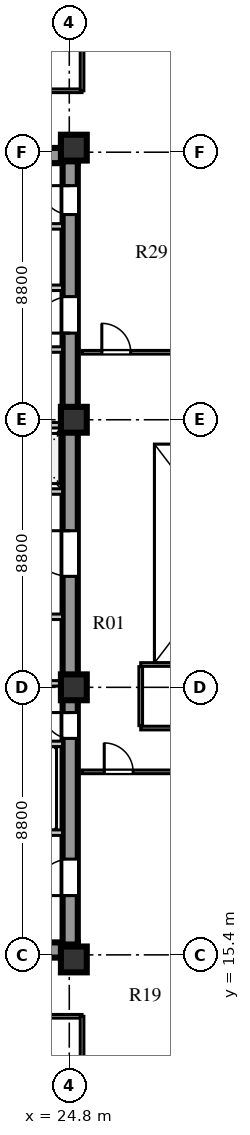
"""IFC4 building model, lengths in metres.
Left out: names, types, materials, properties, quantities, classifications, styles, units other than length and angle.
Written with IfcOpenShell. Run it as: python <this file> out.ifc"""

import sys

from ifc_helpers import new_model, si_unit, direction, frame, frame_2d, origin, origin_2d, place, context, subcontext, project, spatial, rectangle, extrude, element, fill, save


model = new_model("IFC4")
c1 = context("Model", 3, precision=1e-05, world=origin(), true_north=direction((0.0, 1.0)))
c2 = subcontext(c1, "Body", "Model", "MODEL_VIEW")
j1 = project(units=[si_unit("LENGTHUNIT", "METRE"), si_unit("PLANEANGLEUNIT", "RADIAN")], contexts=[c1])
p1 = place(None, origin())
s1 = spatial("IfcSite", under=j1, at=p1, CompositionType="ELEMENT")
p2 = place(p1, origin())
s2 = spatial("IfcBuilding", under=s1, at=p2, CompositionType="ELEMENT")
p3 = place(p2, frame((0.0, 0.0, 181.0)))
s3 = spatial("IfcBuildingStorey", under=s2, at=p3, CompositionType="ELEMENT", Elevation=181.0)
for number, where, z_axis, x_axis in (
    (1, (15.4, 15.56, 0.0), (0.0, 0.0, 1.0), (1.0, 0.0, 0.0)),
    (2, (15.4, 41.69, 0.0), (0.0, 0.0, 1.0), (1.0, 0.0, 0.0)),
):
    element("IfcWall", number, at=place(p3, frame(where, z_axis=z_axis, x_axis=x_axis)), inside=s3, PredefinedType="SHEAR", context=c2, shape_type="SweptSolid", body=[
        extrude(rectangle(XDim=9.68, YDim=0.5, at=frame_2d((4.84, 0.0))), origin(), (0.0, 0.0, 1.0), 3.6),
    ])
p4 = place(p3, frame((24.83, 15.74, 0.0), z_axis=(0.0, 0.0, 1.0), x_axis=(0.0, 1.0, 0.0)))
e3 = element("IfcWall", 3, at=p4, inside=s3, PredefinedType="SHEAR", context=c2, shape_type="SweptSolid", body=[
    extrude(rectangle(XDim=25.76, YDim=0.5, at=frame_2d((12.88, 0.0))), origin(), (0.0, 0.0, 1.0), 3.6),
])
p5 = place(p4, frame((1.61, 0.0, 0.0)))
e4 = element("IfcOpeningElement", 4, at=p5, cuts=e3, PredefinedType="OPENING", context=c2, shape_type="SweptSolid", body=[
    extrude(rectangle(XDim=1.2, YDim=2.1, at=frame_2d((0.6, 1.05))), frame((0.0, 0.26, 0.0), z_axis=(0.0, -1.0, 0.0), x_axis=(1.0, 0.0, 0.0)), (0.0, 0.0, 1.0), 0.52),
])
p6 = place(p4, frame((6.78, 0.0, 0.0)))
e5 = element("IfcOpeningElement", 5, at=p6, cuts=e3, PredefinedType="OPENING", context=c2, shape_type="SweptSolid", body=[
    extrude(rectangle(XDim=0.85, YDim=2.06, at=frame_2d((0.425, 1.03))), frame((0.0, 0.26, 0.0), z_axis=(0.0, -1.0, 0.0), x_axis=(1.0, 0.0, 0.0)), (0.0, 0.0, 1.0), 0.52),
])
p7 = place(p4, frame((12.11, 0.0, 0.0)))
e6 = element("IfcOpeningElement", 6, at=p7, cuts=e3, PredefinedType="OPENING", context=c2, shape_type="SweptSolid", body=[
    extrude(rectangle(XDim=1.5, YDim=2.12, at=frame_2d((0.75, 1.06))), frame((0.0, 0.26, 0.0), z_axis=(0.0, -1.0, 0.0), x_axis=(1.0, 0.0, 0.0)), (0.0, 0.0, 1.0), 0.52),
])
p8 = place(p4, frame((20.11, 0.0, 0.0)))
e7 = element("IfcOpeningElement", 7, at=p8, cuts=e3, PredefinedType="OPENING", context=c2, shape_type="SweptSolid", body=[
    extrude(rectangle(XDim=1.2, YDim=2.12, at=frame_2d((0.6, 1.06))), frame((0.0, 0.26, 0.0), z_axis=(0.0, -1.0, 0.0), x_axis=(1.0, 0.0, 0.0)), (0.0, 0.0, 1.0), 0.52),
])
p9 = place(p4, frame((24.01, 0.0, 0.0)))
e8 = element("IfcOpeningElement", 8, at=p9, cuts=e3, PredefinedType="OPENING", context=c2, shape_type="SweptSolid", body=[
    extrude(rectangle(XDim=0.95, YDim=2.1, at=frame_2d((0.475, 1.05))), frame((0.0, 0.26, 0.0), z_axis=(0.0, -1.0, 0.0), x_axis=(1.0, 0.0, 0.0)), (0.0, 0.0, 1.0), 0.52),
])
for number, where, z_axis, x_axis in (
    (9, (24.95, 15.25, 0.0), (0.0, 0.0, 1.0), (1.0, 0.0, 0.0)),
    (10, (24.95, 24.2, 0.0), (0.0, 0.0, 1.0), (1.0, 0.0, 0.0)),
    (11, (24.95, 33.0, 0.0), (0.0, 0.0, 1.0), (1.0, 0.0, 0.0)),
    (12, (24.95, 41.95, 0.0), (0.0, 0.0, 1.0), (1.0, 0.0, 0.0)),
):
    element("IfcColumn", number, at=place(p3, frame(where, z_axis=z_axis, x_axis=x_axis)), inside=s3, PredefinedType="COLUMN", context=c2, shape_type="SweptSolid", body=[
        extrude(rectangle(XDim=0.85, YDim=0.85, at=origin_2d()), origin(), (0.0, 0.0, 1.0), 3.6),
    ])
p10 = place(p3, frame((19.64, 19.42, 0.0), z_axis=(0.0, 0.0, 1.0), x_axis=(1.0, 0.0, 0.0)))
e13 = element("IfcWall", 13, at=p10, inside=s3, PredefinedType="SOLIDWALL", context=c2, shape_type="SweptSolid", body=[
    extrude(rectangle(XDim=4.94, YDim=0.18, at=frame_2d((2.47, 0.0))), origin(), (0.0, 0.0, 1.0), 3.6),
])
p11 = place(p10, frame((0.72, 0.0, 0.0)))
e14 = element("IfcOpeningElement", 14, at=p11, cuts=e13, PredefinedType="OPENING", context=c2, shape_type="SweptSolid", body=[
    extrude(rectangle(XDim=1.1, YDim=2.1, at=frame_2d((0.55, 1.05))), frame((0.0, 0.1, 0.0), z_axis=(0.0, -1.0, 0.0), x_axis=(1.0, 0.0, 0.0)), (0.0, 0.0, 1.0), 0.2),
])
p12 = place(p10, frame((3.02, 0.0, 0.0)))
e15 = element("IfcOpeningElement", 15, at=p12, cuts=e13, PredefinedType="OPENING", context=c2, shape_type="SweptSolid", body=[
    extrude(rectangle(XDim=1.1, YDim=2.1, at=frame_2d((0.55, 1.05))), frame((0.0, 0.1, 0.0), z_axis=(0.0, -1.0, 0.0), x_axis=(1.0, 0.0, 0.0)), (0.0, 0.0, 1.0), 0.2),
])
p13 = place(p3, frame((19.64, 22.34, 0.0), z_axis=(0.0, 0.0, 1.0), x_axis=(1.0, 0.0, 0.0)))
e16 = element("IfcWall", 16, at=p13, inside=s3, PredefinedType="SOLIDWALL", context=c2, shape_type="SweptSolid", body=[
    extrude(rectangle(XDim=4.94, YDim=0.18, at=frame_2d((2.47, 0.0))), origin(), (0.0, 0.0, 1.0), 3.6),
])
p14 = place(p3, frame((15.9, 26.52, 0.0), z_axis=(0.0, 0.0, 1.0), x_axis=(1.0, 0.0, 0.0)))
e17 = element("IfcWall", 17, at=p14, inside=s3, PredefinedType="SOLIDWALL", context=c2, shape_type="SweptSolid", body=[
    extrude(rectangle(XDim=8.68, YDim=0.18, at=frame_2d((4.34, 0.0))), origin(), (0.0, 0.0, 1.0), 3.6),
])
p15 = place(p14, frame((2.05, 0.0, 0.0)))
e18 = element("IfcOpeningElement", 18, at=p15, cuts=e17, PredefinedType="OPENING", context=c2, shape_type="SweptSolid", body=[
    extrude(rectangle(XDim=0.85, YDim=2.06, at=frame_2d((0.425, 1.03))), frame((0.0, 0.1, 0.0), z_axis=(0.0, -1.0, 0.0), x_axis=(1.0, 0.0, 0.0)), (0.0, 0.0, 1.0), 0.2),
])
p16 = place(p14, frame((5.2, 0.0, 0.0)))
e19 = element("IfcOpeningElement", 19, at=p16, cuts=e17, PredefinedType="OPENING", context=c2, shape_type="SweptSolid", body=[
    extrude(rectangle(XDim=0.95, YDim=2.1, at=frame_2d((0.475, 1.05))), frame((0.0, 0.1, 0.0), z_axis=(0.0, -1.0, 0.0), x_axis=(1.0, 0.0, 0.0)), (0.0, 0.0, 1.0), 0.2),
])
p17 = place(p3, frame((15.9, 24.33, 0.0), z_axis=(0.0, 0.0, 1.0), x_axis=(1.0, 0.0, 0.0)))
e20 = element("IfcWall", 20, at=p17, inside=s3, PredefinedType="SOLIDWALL", context=c2, shape_type="SweptSolid", body=[
    extrude(rectangle(XDim=8.68, YDim=0.18, at=frame_2d((4.34, 0.0))), origin(), (0.0, 0.0, 1.0), 2.95),
])
p18 = place(p3, frame((15.9, 30.64, 0.0), z_axis=(0.0, 0.0, 1.0), x_axis=(1.0, 0.0, 0.0)))
e21 = element("IfcWall", 21, at=p18, inside=s3, PredefinedType="SOLIDWALL", context=c2, shape_type="SweptSolid", body=[
    extrude(rectangle(XDim=8.68, YDim=0.18, at=frame_2d((4.34, 0.0))), origin(), (0.0, 0.0, 1.0), 3.6),
])
p19 = place(p18, frame((1.76, 0.0, 0.0)))
e22 = element("IfcOpeningElement", 22, at=p19, cuts=e21, PredefinedType="OPENING", context=c2, shape_type="SweptSolid", body=[
    extrude(rectangle(XDim=1.0, YDim=2.1, at=frame_2d((0.5, 1.05))), frame((0.0, 0.1, 0.0), z_axis=(0.0, -1.0, 0.0), x_axis=(1.0, 0.0, 0.0)), (0.0, 0.0, 1.0), 0.2),
])
p20 = place(p18, frame((3.6, 0.0, 0.0)))
e23 = element("IfcOpeningElement", 23, at=p20, cuts=e21, PredefinedType="OPENING", context=c2, shape_type="SweptSolid", body=[
    extrude(rectangle(XDim=1.0, YDim=2.1, at=frame_2d((0.5, 1.05))), frame((0.0, 0.1, 0.0), z_axis=(0.0, -1.0, 0.0), x_axis=(1.0, 0.0, 0.0)), (0.0, 0.0, 1.0), 0.2),
])
p21 = place(p18, frame((5.44, 0.0, 0.0)))
e24 = element("IfcOpeningElement", 24, at=p21, cuts=e21, PredefinedType="OPENING", context=c2, shape_type="SweptSolid", body=[
    extrude(rectangle(XDim=1.0, YDim=2.1, at=frame_2d((0.5, 1.05))), frame((0.0, 0.1, 0.0), z_axis=(0.0, -1.0, 0.0), x_axis=(1.0, 0.0, 0.0)), (0.0, 0.0, 1.0), 0.2),
])
p22 = place(p18, frame((7.28, 0.0, 0.0)))
e25 = element("IfcOpeningElement", 25, at=p22, cuts=e21, PredefinedType="OPENING", context=c2, shape_type="SweptSolid", body=[
    extrude(rectangle(XDim=1.0, YDim=2.1, at=frame_2d((0.5, 1.05))), frame((0.0, 0.1, 0.0), z_axis=(0.0, -1.0, 0.0), x_axis=(1.0, 0.0, 0.0)), (0.0, 0.0, 1.0), 0.2),
])
p23 = place(p3, frame((15.9, 32.82, 0.0), z_axis=(0.0, 0.0, 1.0), x_axis=(1.0, 0.0, 0.0)))
e26 = element("IfcWall", 26, at=p23, inside=s3, PredefinedType="SOLIDWALL", context=c2, shape_type="SweptSolid", body=[
    extrude(rectangle(XDim=8.68, YDim=0.18, at=frame_2d((4.34, 0.0))), origin(), (0.0, 0.0, 1.0), 2.95),
])
p24 = place(p3, frame((22.02, 35.31, 0.0), z_axis=(0.0, 0.0, 1.0), x_axis=(1.0, 0.0, 0.0)))
e27 = element("IfcWall", 27, at=p24, inside=s3, PredefinedType="SOLIDWALL", context=c2, shape_type="SweptSolid", body=[
    extrude(rectangle(XDim=2.56, YDim=0.18, at=frame_2d((1.28, 0.0))), origin(), (0.0, 0.0, 1.0), 3.6),
])
p25 = place(p24, frame((0.55, 0.0, 0.0)))
e28 = element("IfcOpeningElement", 28, at=p25, cuts=e27, PredefinedType="OPENING", context=c2, shape_type="SweptSolid", body=[
    extrude(rectangle(XDim=1.0, YDim=2.1, at=frame_2d((0.5, 1.05))), frame((0.0, 0.1, 0.0), z_axis=(0.0, -1.0, 0.0), x_axis=(1.0, 0.0, 0.0)), (0.0, 0.0, 1.0), 0.2),
])
p26 = place(p3, frame((19.64, 37.34, 0.0), z_axis=(0.0, 0.0, 1.0), x_axis=(1.0, 0.0, 0.0)))
e29 = element("IfcWall", 29, at=p26, inside=s3, PredefinedType="SOLIDWALL", context=c2, shape_type="SweptSolid", body=[
    extrude(rectangle(XDim=4.94, YDim=0.18, at=frame_2d((2.47, 0.0))), origin(), (0.0, 0.0, 1.0), 3.6),
])
p27 = place(p26, frame((0.45, 0.0, 0.0)))
e30 = element("IfcOpeningElement", 30, at=p27, cuts=e29, PredefinedType="OPENING", context=c2, shape_type="SweptSolid", body=[
    extrude(rectangle(XDim=1.0, YDim=2.1, at=frame_2d((0.5, 1.05))), frame((0.0, 0.1, 0.0), z_axis=(0.0, -1.0, 0.0), x_axis=(1.0, 0.0, 0.0)), (0.0, 0.0, 1.0), 0.2),
])
p28 = place(p26, frame((2.5, 0.0, 0.0)))
e31 = element("IfcOpeningElement", 31, at=p28, cuts=e29, PredefinedType="OPENING", context=c2, shape_type="SweptSolid", body=[
    extrude(rectangle(XDim=1.0, YDim=2.1, at=frame_2d((0.5, 1.05))), frame((0.0, 0.1, 0.0), z_axis=(0.0, -1.0, 0.0), x_axis=(1.0, 0.0, 0.0)), (0.0, 0.0, 1.0), 0.2),
])
p29 = place(p3, frame((19.64, 39.36, 0.0), z_axis=(0.0, 0.0, 1.0), x_axis=(1.0, 0.0, 0.0)))
e32 = element("IfcWall", 32, at=p29, inside=s3, PredefinedType="SOLIDWALL", context=c2, shape_type="SweptSolid", body=[
    extrude(rectangle(XDim=4.94, YDim=0.18, at=frame_2d((2.47, 0.0))), origin(), (0.0, 0.0, 1.0), 3.6),
])
p30 = place(p3, frame((25.22, 21.42, 0.0), z_axis=(0.0, 0.0, 1.0), x_axis=(1.0, 0.0, 0.0)))
e33 = element("IfcWall", 33, at=p30, inside=s3, PredefinedType="PARTITIONING", context=c2, shape_type="SweptSolid", body=[
    extrude(rectangle(XDim=15.6, YDim=0.12, at=frame_2d((7.8, 0.0))), origin(), (0.0, 0.0, 1.0), 3.25),
])
p31 = place(p30, frame((0.73, 0.0, 0.0)))
e34 = element("IfcOpeningElement", 34, at=p31, cuts=e33, PredefinedType="OPENING", context=c2, shape_type="SweptSolid", body=[
    extrude(rectangle(XDim=0.95, YDim=2.1, at=frame_2d((0.475, 1.05))), frame((0.0, 0.07, 0.0), z_axis=(0.0, -1.0, 0.0), x_axis=(1.0, 0.0, 0.0)), (0.0, 0.0, 1.0), 0.14),
])
p32 = place(p30, frame((4.83, 0.0, 0.0)))
e35 = element("IfcOpeningElement", 35, at=p32, cuts=e33, PredefinedType="OPENING", context=c2, shape_type="SweptSolid", body=[
    extrude(rectangle(XDim=0.95, YDim=2.1, at=frame_2d((0.475, 1.05))), frame((0.0, 0.07, 0.0), z_axis=(0.0, -1.0, 0.0), x_axis=(1.0, 0.0, 0.0)), (0.0, 0.0, 1.0), 0.14),
])
p33 = place(p30, frame((10.23, 0.0, 0.0)))
e36 = element("IfcOpeningElement", 36, at=p33, cuts=e33, PredefinedType="OPENING", context=c2, shape_type="SweptSolid", body=[
    extrude(rectangle(XDim=0.95, YDim=2.1, at=frame_2d((0.475, 1.05))), frame((0.0, 0.07, 0.0), z_axis=(0.0, -1.0, 0.0), x_axis=(1.0, 0.0, 0.0)), (0.0, 0.0, 1.0), 0.14),
])
p34 = place(p3, frame((27.15, 22.86, 0.0), z_axis=(0.0, 0.0, 1.0), x_axis=(1.0, 0.0, 0.0)))
e37 = element("IfcWall", 37, at=p34, inside=s3, PredefinedType="PARTITIONING", context=c2, shape_type="SweptSolid", body=[
    extrude(rectangle(XDim=13.67, YDim=0.12, at=frame_2d((6.835, 0.0))), origin(), (0.0, 0.0, 1.0), 3.6),
])
p35 = place(p34, frame((2.2, 0.0, 0.0)))
e38 = element("IfcOpeningElement", 38, at=p35, cuts=e37, PredefinedType="OPENING", context=c2, shape_type="SweptSolid", body=[
    extrude(rectangle(XDim=0.9, YDim=2.08, at=frame_2d((0.45, 1.04))), frame((0.0, 0.07, 0.0), z_axis=(0.0, -1.0, 0.0), x_axis=(1.0, 0.0, 0.0)), (0.0, 0.0, 1.0), 0.14),
])
p36 = place(p3, frame((25.22, 35.22, 0.0), z_axis=(0.0, 0.0, 1.0), x_axis=(1.0, 0.0, 0.0)))
e39 = element("IfcWall", 39, at=p36, inside=s3, PredefinedType="PARTITIONING", context=c2, shape_type="SweptSolid", body=[
    extrude(rectangle(XDim=9.5, YDim=0.12, at=frame_2d((4.75, 0.0))), origin(), (0.0, 0.0, 1.0), 3.6),
])
p37 = place(p36, frame((0.65, 0.0, 0.0)))
e40 = element("IfcOpeningElement", 40, at=p37, cuts=e39, PredefinedType="OPENING", context=c2, shape_type="SweptSolid", body=[
    extrude(rectangle(XDim=0.95, YDim=2.1, at=frame_2d((0.475, 1.05))), frame((0.0, 0.07, 0.0), z_axis=(0.0, -1.0, 0.0), x_axis=(1.0, 0.0, 0.0)), (0.0, 0.0, 1.0), 0.14),
])
p38 = place(p36, frame((5.4, 0.0, 0.0)))
e41 = element("IfcOpeningElement", 41, at=p38, cuts=e39, PredefinedType="OPENING", context=c2, shape_type="SweptSolid", body=[
    extrude(rectangle(XDim=1.05, YDim=2.1, at=frame_2d((0.525, 1.05))), frame((0.0, 0.07, 0.0), z_axis=(0.0, -1.0, 0.0), x_axis=(1.0, 0.0, 0.0)), (0.0, 0.0, 1.0), 0.14),
])
p39 = place(p3, frame((13.39, 13.38, 0.0), z_axis=(0.0, 0.0, 1.0), x_axis=(1.0, 0.0, 0.0)))
e42 = element("IfcWall", 42, at=p39, inside=s3, PredefinedType="PARTITIONING", context=c2, shape_type="SweptSolid", body=[
    extrude(rectangle(XDim=11.83, YDim=0.12, at=frame_2d((5.915, 0.0))), origin(), (0.0, 0.0, 1.0), 3.6),
])
p40 = place(p39, frame((4.76, 0.0, 0.0)))
e43 = element("IfcOpeningElement", 43, at=p40, cuts=e42, PredefinedType="OPENING", context=c2, shape_type="SweptSolid", body=[
    extrude(rectangle(XDim=1.0, YDim=2.08, at=frame_2d((0.5, 1.04))), frame((0.0, 0.07, 0.0), z_axis=(0.0, -1.0, 0.0), x_axis=(1.0, 0.0, 0.0)), (0.0, 0.0, 1.0), 0.14),
])
p41 = place(p3, frame((25.22, 7.88, 0.0), z_axis=(0.0, 0.0, 1.0), x_axis=(0.0, 1.0, 0.0)))
e44 = element("IfcWall", 44, at=p41, inside=s3, PredefinedType="PARTITIONING", context=c2, shape_type="SweptSolid", body=[
    extrude(rectangle(XDim=5.5, YDim=0.12, at=frame_2d((2.75, 0.0))), origin(), (0.0, 0.0, 1.0), 3.15),
])
p42 = place(p3, frame((13.39, 43.82, 0.0), z_axis=(0.0, 0.0, 1.0), x_axis=(1.0, 0.0, 0.0)))
e45 = element("IfcWall", 45, at=p42, inside=s3, PredefinedType="PARTITIONING", context=c2, shape_type="SweptSolid", body=[
    extrude(rectangle(XDim=11.83, YDim=0.12, at=frame_2d((5.915, 0.0))), origin(), (0.0, 0.0, 1.0), 3.6),
])
p43 = place(p42, frame((4.76, 0.0, 0.0)))
e46 = element("IfcOpeningElement", 46, at=p43, cuts=e45, PredefinedType="OPENING", context=c2, shape_type="SweptSolid", body=[
    extrude(rectangle(XDim=1.0, YDim=2.08, at=frame_2d((0.5, 1.04))), frame((0.0, 0.07, 0.0), z_axis=(0.0, -1.0, 0.0), x_axis=(1.0, 0.0, 0.0)), (0.0, 0.0, 1.0), 0.14),
])
p44 = place(p3, frame((25.22, 43.82, 0.0), z_axis=(0.0, 0.0, 1.0), x_axis=(0.0, 1.0, 0.0)))
e47 = element("IfcWall", 47, at=p44, inside=s3, PredefinedType="PARTITIONING", context=c2, shape_type="SweptSolid", body=[
    extrude(rectangle(XDim=5.5, YDim=0.12, at=frame_2d((2.75, 0.0))), origin(), (0.0, 0.0, 1.0), 3.15),
])
p45 = place(p3, frame((27.15, 24.95, 0.0), z_axis=(0.0, 0.0, 1.0), x_axis=(1.0, 0.0, 0.0)))
e48 = element("IfcWall", 48, at=p45, inside=s3, PredefinedType="PARTITIONING", context=c2, shape_type="SweptSolid", body=[
    extrude(rectangle(XDim=9.67, YDim=0.12, at=frame_2d((4.835, 0.0))), origin(), (0.0, 0.0, 1.0), 3.05),
])
p46 = place(p3, frame((27.15, 22.94, 0.0), z_axis=(0.0, 0.0, 1.0), x_axis=(0.0, 1.0, 0.0)))
e49 = element("IfcWall", 49, at=p46, inside=s3, PredefinedType="PARTITIONING", context=c2, shape_type="SweptSolid", body=[
    extrude(rectangle(XDim=1.94, YDim=0.12, at=frame_2d((0.97, 0.0))), origin(), (0.0, 0.0, 1.0), 3.6),
])
p47 = place(p5, frame((1.2, 0.0, 0.0), z_axis=(0.0, 0.0, 1.0), x_axis=(-1.0, 0.0, 0.0)))
e50 = element("IfcDoor", 50, at=p47, inside=s3, OperationType="SINGLE_SWING_RIGHT", PredefinedType="DOOR", context=c2, shape_type="SweptSolid", body=[
    extrude(rectangle(XDim=1.2, YDim=2.1, at=frame_2d((0.6, 1.05))), frame((0.0, 0.025, 0.0), z_axis=(0.0, -1.0, 0.0), x_axis=(1.0, 0.0, 0.0)), (0.0, 0.0, 1.0), 0.05),
])
fill(e4, e50)
p48 = place(p6, frame((0.85, 0.0, 0.0), z_axis=(0.0, 0.0, 1.0), x_axis=(-1.0, 0.0, 0.0)))
e51 = element("IfcDoor", 51, at=p48, inside=s3, OperationType="SINGLE_SWING_LEFT", PredefinedType="DOOR", context=c2, shape_type="SweptSolid", body=[
    extrude(rectangle(XDim=0.85, YDim=2.06, at=frame_2d((0.425, 1.03))), frame((0.0, 0.025, 0.0), z_axis=(0.0, -1.0, 0.0), x_axis=(1.0, 0.0, 0.0)), (0.0, 0.0, 1.0), 0.05),
])
fill(e5, e51)
p49 = place(p7, frame((1.5, 0.0, 0.0), z_axis=(0.0, 0.0, 1.0), x_axis=(-1.0, 0.0, 0.0)))
e52 = element("IfcDoor", 52, at=p49, inside=s3, OperationType="SINGLE_SWING_LEFT", PredefinedType="DOOR", context=c2, shape_type="SweptSolid", body=[
    extrude(rectangle(XDim=1.5, YDim=2.12, at=frame_2d((0.75, 1.06))), frame((0.0, 0.025, 0.0), z_axis=(0.0, -1.0, 0.0), x_axis=(1.0, 0.0, 0.0)), (0.0, 0.0, 1.0), 0.05),
])
fill(e6, e52)
p50 = place(p8, frame((1.2, 0.0, 0.0), z_axis=(0.0, 0.0, 1.0), x_axis=(-1.0, 0.0, 0.0)))
e53 = element("IfcDoor", 53, at=p50, inside=s3, OperationType="SINGLE_SWING_RIGHT", PredefinedType="DOOR", context=c2, shape_type="SweptSolid", body=[
    extrude(rectangle(XDim=1.2, YDim=2.12, at=frame_2d((0.6, 1.06))), frame((0.0, 0.025, 0.0), z_axis=(0.0, -1.0, 0.0), x_axis=(1.0, 0.0, 0.0)), (0.0, 0.0, 1.0), 0.05),
])
fill(e7, e53)
p51 = place(p9, frame((0.95, 0.0, 0.0), z_axis=(0.0, 0.0, 1.0), x_axis=(-1.0, 0.0, 0.0)))
e54 = element("IfcDoor", 54, at=p51, inside=s3, OperationType="SINGLE_SWING_LEFT", PredefinedType="DOOR", context=c2, shape_type="SweptSolid", body=[
    extrude(rectangle(XDim=0.95, YDim=2.1, at=frame_2d((0.475, 1.05))), frame((0.0, 0.025, 0.0), z_axis=(0.0, -1.0, 0.0), x_axis=(1.0, 0.0, 0.0)), (0.0, 0.0, 1.0), 0.05),
])
fill(e8, e54)
p52 = place(p31, frame((0.95, 0.0, 0.0), z_axis=(0.0, 0.0, 1.0), x_axis=(-1.0, 0.0, 0.0)))
e55 = element("IfcDoor", 55, at=p52, inside=s3, OperationType="SINGLE_SWING_RIGHT", PredefinedType="DOOR", context=c2, shape_type="SweptSolid", body=[
    extrude(rectangle(XDim=0.95, YDim=2.1, at=frame_2d((0.475, 1.05))), frame((0.0, 0.025, 0.0), z_axis=(0.0, -1.0, 0.0), x_axis=(1.0, 0.0, 0.0)), (0.0, 0.0, 1.0), 0.05),
])
fill(e34, e55)
p53 = place(p37, origin())
e56 = element("IfcDoor", 56, at=p53, inside=s3, OperationType="SINGLE_SWING_LEFT", PredefinedType="DOOR", context=c2, shape_type="SweptSolid", body=[
    extrude(rectangle(XDim=0.95, YDim=2.1, at=frame_2d((0.475, 1.05))), frame((0.0, 0.025, 0.0), z_axis=(0.0, -1.0, 0.0), x_axis=(1.0, 0.0, 0.0)), (0.0, 0.0, 1.0), 0.05),
])
fill(e40, e56)
save(model, sys.argv[1])
